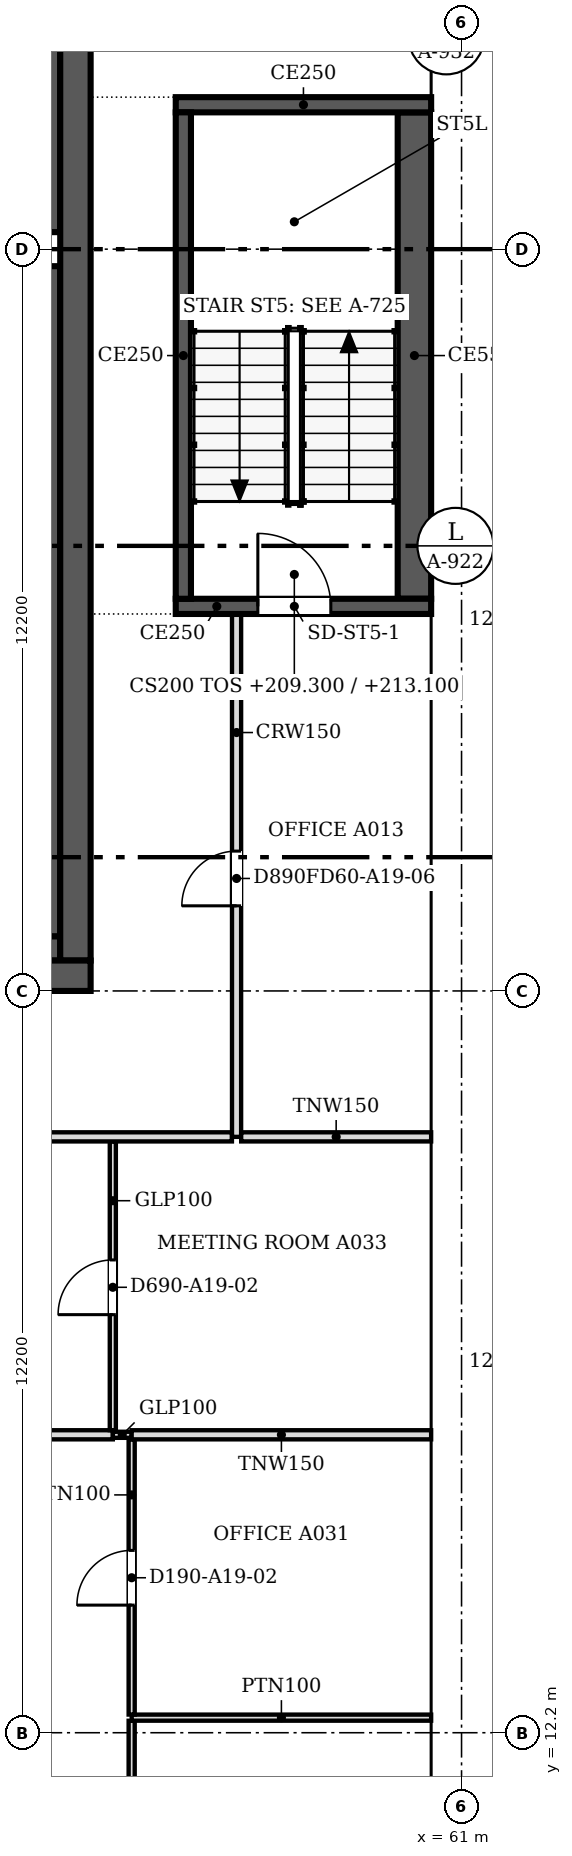
"""IFC4 building model, lengths in metres.
Left out: names, types, materials, properties, quantities, classifications, styles, units other than length and angle.
Written with IfcOpenShell. Run it as: python <this file> out.ifc"""

import sys

from ifc_helpers import new_model, si_unit, direction, frame, frame_2d, origin, place, context, subcontext, project, spatial, polyline, rectangle, outline, extrude, faceted_brep, source, transform, mapped, element, fill, save


model = new_model("IFC4")
c1 = context("Model", 3, precision=1e-05, world=origin(), true_north=direction((0.0, 1.0)))
c2 = subcontext(c1, "Body", "Model", "MODEL_VIEW")
j1 = project(units=[si_unit("LENGTHUNIT", "METRE"), si_unit("PLANEANGLEUNIT", "RADIAN")], contexts=[c1])
p1 = place(None, origin())
s1 = spatial("IfcSite", under=j1, at=p1, CompositionType="ELEMENT")
p2 = place(p1, origin())
s2 = spatial("IfcBuilding", under=s1, at=p2, CompositionType="ELEMENT")
p3 = place(p2, frame((0.0, 0.0, 209.3)))
s3 = spatial("IfcBuildingStorey", under=s2, at=p3, CompositionType="ELEMENT", Elevation=209.3)
m1 = source(origin(), c2, "Body", "SweptSolid", [
    extrude(outline(polyline([(3.05, 0.0), (6.1, 3.8), (3.05, 7.6), (0.0, 3.8), (3.05, 0.0)])), frame((0.0, 0.25, 0.0), z_axis=(0.0, -1.0, 0.0), x_axis=(1.0, 0.0, 0.0)), (0.0, 0.0, 1.0), 0.5),
])
p4 = place(p3, frame((60.75, 9.15, -3.8), z_axis=(0.0, 0.0, 1.0), x_axis=(0.0, 1.0, 0.0)))
e1 = element("IfcWall", 1, at=p4, inside=s3, PredefinedType="SOLIDWALL", context=c2, shape_type="MappedRepresentation", body=[
    mapped(m1, transform((0.0, 0.0, 0.0), scale=1.0)),
])
m2 = source(origin(), c2, "Body", "SweptSolid", [
    extrude(outline(polyline([(3.05, 0.399), (5.78, 3.8), (3.05, 7.201), (0.321, 3.8), (3.05, 0.399)])), frame((0.0, 0.26, 0.0), z_axis=(0.0, -1.0, 0.0), x_axis=(1.0, 0.0, 0.0)), (0.0, 0.0, 1.0), 0.52),
])
p5 = place(p4, origin())
e2 = element("IfcOpeningElement", 2, at=p5, cuts=e1, PredefinedType="OPENING", context=c2, shape_type="MappedRepresentation", body=[
    mapped(m2, transform((0.0, 0.0, 0.0), scale=1.0)),
])
p6 = place(p3, frame((60.75, 15.25, -3.8), z_axis=(0.0, 0.0, 1.0), x_axis=(0.0, 1.0, 0.0)))
e3 = element("IfcWall", 3, at=p6, inside=s3, PredefinedType="SOLIDWALL", context=c2, shape_type="MappedRepresentation", body=[
    mapped(m1, transform((0.0, 0.0, 0.0), scale=1.0)),
])
p7 = place(p6, origin())
e4 = element("IfcOpeningElement", 4, at=p7, cuts=e3, PredefinedType="OPENING", context=c2, shape_type="MappedRepresentation", body=[
    mapped(m2, transform((0.0, 0.0, 0.0), scale=1.0)),
])
m3 = source(origin(), c2, "Body", "Brep", [
    faceted_brep([(3.05, -0.25, 0.0), (6.1, -0.25, 3.8), (6.1, -0.25, 3.8), (3.05, -0.25, 7.6), (0.0, -0.25, 3.8), (0.0, 0.25, 3.8), (3.05, 0.25, 7.6), (6.1, 0.25, 3.8), (6.1, 0.25, 3.8), (3.05, 0.25, 0.0)], [[[0, 1, 2, 3, 4]], [[5, 6, 7, 8, 9]], [[9, 8, 1, 0]], [[7, 6, 3, 2]], [[6, 5, 4, 3]], [[5, 9, 0, 4]], [[1, 8, 7, 2]]]),
])
p8 = place(p3, frame((60.75, 21.35, -3.8), z_axis=(0.0, 0.0, 1.0), x_axis=(0.0, 1.0, 0.0)))
e5 = element("IfcWall", 5, at=p8, inside=s3, PredefinedType="SOLIDWALL", context=c2, shape_type="MappedRepresentation", body=[
    mapped(m3, transform((0.0, 0.0, 0.0), scale=1.0)),
])
p9 = place(p8, origin())
e6 = element("IfcOpeningElement", 6, at=p9, cuts=e5, PredefinedType="OPENING", context=c2, shape_type="MappedRepresentation", body=[
    mapped(m2, transform((0.0, 0.0, 0.0), scale=1.0)),
])
p10 = place(p3, frame((60.75, 27.45, -3.8), z_axis=(0.0, 0.0, 1.0), x_axis=(0.0, 1.0, 0.0)))
e7 = element("IfcWall", 7, at=p10, inside=s3, PredefinedType="SOLIDWALL", context=c2, shape_type="MappedRepresentation", body=[
    mapped(m1, transform((0.0, 0.0, 0.0), scale=1.0)),
])
p11 = place(p10, origin())
e8 = element("IfcOpeningElement", 8, at=p11, cuts=e7, PredefinedType="OPENING", context=c2, shape_type="MappedRepresentation", body=[
    mapped(m2, transform((0.0, 0.0, 0.0), scale=1.0)),
])
p12 = place(p3, frame((60.75, 33.55, -3.8), z_axis=(0.0, 0.0, 1.0), x_axis=(0.0, 1.0, 0.0)))
e9 = element("IfcWall", 9, at=p12, inside=s3, PredefinedType="SOLIDWALL", context=c2, shape_type="MappedRepresentation", body=[
    mapped(m3, transform((0.0, 0.0, 0.0), scale=1.0)),
])
p13 = place(p12, origin())
e10 = element("IfcOpeningElement", 10, at=p13, cuts=e9, PredefinedType="OPENING", context=c2, shape_type="MappedRepresentation", body=[
    mapped(m2, transform((0.0, 0.0, 0.0), scale=1.0)),
])
p14 = place(p3, frame((60.75, 39.65, -3.8), z_axis=(0.0, 0.0, 1.0), x_axis=(0.0, 1.0, 0.0)))
e11 = element("IfcWall", 11, at=p14, inside=s3, PredefinedType="SOLIDWALL", context=c2, shape_type="MappedRepresentation", body=[
    mapped(m1, transform((0.0, 0.0, 0.0), scale=1.0)),
])
p15 = place(p14, origin())
e12 = element("IfcOpeningElement", 12, at=p15, cuts=e11, PredefinedType="OPENING", context=c2, shape_type="MappedRepresentation", body=[
    mapped(m2, transform((0.0, 0.0, 0.0), scale=1.0)),
])
p16 = place(p2, frame((0.0, 0.0, 213.1)))
s4 = spatial("IfcBuildingStorey", under=s2, at=p16, CompositionType="ELEMENT", Elevation=213.1)
m4 = source(origin(), c2, "Body", "Brep", [
    faceted_brep([(3.003, -0.25, 0.0), (6.053, -0.25, 3.8), (3.003, -0.25, 7.6), (0.0, -0.25, 3.8), (0.047, 0.25, 3.859), (3.003, 0.25, 7.6), (6.053, 0.25, 3.8), (3.003, 0.25, 0.0), (0.047, 0.25, 3.741), (0.0, 0.0, 3.8)], [[[0, 1, 2, 3]], [[4, 5, 6, 7, 8]], [[7, 6, 1, 0]], [[6, 5, 2, 1]], [[5, 4, 9, 3, 2]], [[8, 7, 0, 3, 9]], [[8, 9, 4]]]),
])
p17 = place(p16, frame((60.75, 6.146, -3.8), z_axis=(0.0, 0.0, 1.0), x_axis=(0.0, 1.0, 0.0)))
e13 = element("IfcWall", 13, at=p17, inside=s4, PredefinedType="SOLIDWALL", context=c2, shape_type="MappedRepresentation", body=[
    mapped(m4, transform((0.0, 0.0, 0.0), scale=1.0)),
])
m5 = source(origin(), c2, "Body", "SweptSolid", [
    extrude(outline(polyline([(3.005, 0.401), (5.733, 3.8), (3.005, 7.199), (0.319, 3.8), (3.005, 0.401)])), frame((0.0, 0.26, 0.0), z_axis=(0.0, -1.0, 0.0), x_axis=(1.0, 0.0, 0.0)), (0.0, 0.0, 1.0), 0.52),
])
p18 = place(p17, origin())
e14 = element("IfcOpeningElement", 14, at=p18, cuts=e13, PredefinedType="OPENING", context=c2, shape_type="MappedRepresentation", body=[
    mapped(m5, transform((0.0, 0.0, 0.0), scale=1.0)),
])
m6 = source(origin(), c2, "Body", "SweptSolid", [
    extrude(outline(polyline([(3.05, 0.0), (6.1, 3.8), (3.05, 7.6), (0.0, 3.8), (3.05, 0.0)])), frame((0.0, 0.25, 0.0), z_axis=(0.0, -1.0, 0.0), x_axis=(1.0, 0.0, 0.0)), (0.0, 0.0, 1.0), 0.5),
])
p19 = place(p16, frame((60.75, 12.2, -3.8), z_axis=(0.0, 0.0, 1.0), x_axis=(0.0, 1.0, 0.0)))
e15 = element("IfcWall", 15, at=p19, inside=s4, PredefinedType="SOLIDWALL", context=c2, shape_type="MappedRepresentation", body=[
    mapped(m6, transform((0.0, 0.0, 0.0), scale=1.0)),
])
m7 = source(origin(), c2, "Body", "SweptSolid", [
    extrude(outline(polyline([(3.05, 0.399), (5.78, 3.8), (3.05, 7.2), (0.321, 3.8), (3.05, 0.399)])), frame((0.0, 0.26, 0.0), z_axis=(0.0, -1.0, 0.0), x_axis=(1.0, 0.0, 0.0)), (0.0, 0.0, 1.0), 0.52),
])
p20 = place(p19, origin())
e16 = element("IfcOpeningElement", 16, at=p20, cuts=e15, PredefinedType="OPENING", context=c2, shape_type="MappedRepresentation", body=[
    mapped(m7, transform((0.0, 0.0, 0.0), scale=1.0)),
])
m8 = source(origin(), c2, "Body", "Brep", [
    faceted_brep([(3.05, -0.25, 0.0), (6.1, -0.25, 3.8), (6.1, -0.25, 3.8), (3.05, -0.25, 7.6), (0.0, -0.25, 3.8), (0.0, 0.25, 3.8), (3.05, 0.25, 7.6), (6.1, 0.25, 3.8), (6.1, 0.25, 3.8), (3.05, 0.25, 0.0)], [[[0, 1, 2, 3, 4]], [[5, 6, 7, 8, 9]], [[9, 8, 1, 0]], [[7, 6, 3, 2]], [[6, 5, 4, 3]], [[5, 9, 0, 4]], [[1, 8, 7, 2]]]),
])
p21 = place(p16, frame((60.75, 18.3, -3.8), z_axis=(0.0, 0.0, 1.0), x_axis=(0.0, 1.0, 0.0)))
e17 = element("IfcWall", 17, at=p21, inside=s4, PredefinedType="SOLIDWALL", context=c2, shape_type="MappedRepresentation", body=[
    mapped(m8, transform((0.0, 0.0, 0.0), scale=1.0)),
])
p22 = place(p21, origin())
e18 = element("IfcOpeningElement", 18, at=p22, cuts=e17, PredefinedType="OPENING", context=c2, shape_type="MappedRepresentation", body=[
    mapped(m7, transform((0.0, 0.0, 0.0), scale=1.0)),
])
p23 = place(p16, frame((60.75, 24.4, -3.8), z_axis=(0.0, 0.0, 1.0), x_axis=(0.0, 1.0, 0.0)))
e19 = element("IfcWall", 19, at=p23, inside=s4, PredefinedType="SOLIDWALL", context=c2, shape_type="MappedRepresentation", body=[
    mapped(m6, transform((0.0, 0.0, 0.0), scale=1.0)),
])
p24 = place(p23, origin())
e20 = element("IfcOpeningElement", 20, at=p24, cuts=e19, PredefinedType="OPENING", context=c2, shape_type="MappedRepresentation", body=[
    mapped(m7, transform((0.0, 0.0, 0.0), scale=1.0)),
])
p25 = place(p16, frame((60.75, 30.5, -3.8), z_axis=(0.0, 0.0, 1.0), x_axis=(0.0, 1.0, 0.0)))
e21 = element("IfcWall", 21, at=p25, inside=s4, PredefinedType="SOLIDWALL", context=c2, shape_type="MappedRepresentation", body=[
    mapped(m6, transform((0.0, 0.0, 0.0), scale=1.0)),
])
p26 = place(p25, origin())
e22 = element("IfcOpeningElement", 22, at=p26, cuts=e21, PredefinedType="OPENING", context=c2, shape_type="MappedRepresentation", body=[
    mapped(m7, transform((0.0, 0.0, 0.0), scale=1.0)),
])
p27 = place(p16, frame((60.75, 36.6, -3.8), z_axis=(0.0, 0.0, 1.0), x_axis=(0.0, 1.0, 0.0)))
e23 = element("IfcWall", 23, at=p27, inside=s4, PredefinedType="SOLIDWALL", context=c2, shape_type="MappedRepresentation", body=[
    mapped(m8, transform((0.0, 0.0, 0.0), scale=1.0)),
])
p28 = place(p27, origin())
e24 = element("IfcOpeningElement", 24, at=p28, cuts=e23, PredefinedType="OPENING", context=c2, shape_type="MappedRepresentation", body=[
    mapped(m7, transform((0.0, 0.0, 0.0), scale=1.0)),
])
p29 = place(p3, frame((54.9, 24.65, 0.0), z_axis=(0.0, 0.0, 1.0), x_axis=(-1.0, 0.0, 0.0)))
e25 = element("IfcWall", 25, at=p29, inside=s3, PredefinedType="SHEAR", context=c2, shape_type="SweptSolid", body=[
    extrude(rectangle(XDim=24.4, YDim=0.5, at=frame_2d((12.2, 0.0))), origin(), (0.0, 0.0, 1.0), 3.8),
])
m9 = source(origin(), c2, "Body", "SweptSolid", [
    extrude(rectangle(XDim=1.2, YDim=2.1, at=frame_2d((0.6, 1.05))), frame((0.0, 0.26, 0.0), z_axis=(0.0, -1.0, 0.0), x_axis=(1.0, 0.0, 0.0)), (0.0, 0.0, 1.0), 0.52),
])
p30 = place(p29, frame((1.5, 0.0, 0.0)))
e26 = element("IfcOpeningElement", 26, at=p30, cuts=e25, PredefinedType="OPENING", context=c2, shape_type="MappedRepresentation", body=[
    mapped(m9, transform((0.0, 0.0, 0.0), scale=1.0)),
])
p31 = place(p3, frame((54.65, 48.3, 0.0), z_axis=(0.0, 0.0, 1.0), x_axis=(0.0, -1.0, 0.0)))
e27 = element("IfcWall", 27, at=p31, inside=s3, PredefinedType="SHEAR", context=c2, shape_type="SweptSolid", body=[
    extrude(rectangle(XDim=23.4, YDim=0.5, at=frame_2d((11.7, 0.0))), origin(), (0.0, 0.0, 1.0), 3.8),
])
p32 = place(p31, frame((5.0, 0.0, 0.0)))
e28 = element("IfcOpeningElement", 28, at=p32, cuts=e27, PredefinedType="OPENING", context=c2, shape_type="MappedRepresentation", body=[
    mapped(m9, transform((0.0, 0.0, 0.0), scale=1.0)),
])
p33 = place(p3, frame((53.4, 25.1, 0.0), z_axis=(0.0, 0.0, 1.0), x_axis=(1.0, 0.0, 0.0)))
e29 = element("IfcWall", 29, at=p33, inside=s3, PredefinedType="SOLIDWALL", context=c2, shape_type="SweptSolid", body=[
    extrude(rectangle(XDim=1.0, YDim=0.4, at=frame_2d((0.5, 0.0))), origin(), (0.0, 0.0, 1.0), 3.8),
])
p34 = place(p3, frame((54.2, 25.3, 0.0), z_axis=(0.0, 0.0, 1.0), x_axis=(0.0, 1.0, 0.0)))
e30 = element("IfcWall", 30, at=p34, inside=s3, PredefinedType="SOLIDWALL", context=c2, shape_type="SweptSolid", body=[
    extrude(rectangle(XDim=11.02, YDim=0.4, at=frame_2d((5.51, 0.0))), origin(), (0.0, 0.0, 1.0), 3.8),
])
p35 = place(p3, frame((54.2, 36.88, 0.0), z_axis=(0.0, 0.0, 1.0), x_axis=(0.0, 1.0, 0.0)))
e31 = element("IfcWall", 31, at=p35, inside=s3, PredefinedType="SOLIDWALL", context=c2, shape_type="SweptSolid", body=[
    extrude(rectangle(XDim=5.22, YDim=0.4, at=frame_2d((2.61, 0.0))), origin(), (0.0, 0.0, 1.0), 3.8),
])
p36 = place(p3, frame((60.5, 30.725, 0.0), z_axis=(0.0, 0.0, 1.0), x_axis=(-1.0, 0.0, 0.0)))
e32 = element("IfcWall", 32, at=p36, inside=s3, PredefinedType="SOLIDWALL", context=c2, shape_type="SweptSolid", body=[
    extrude(rectangle(XDim=4.2, YDim=0.25, at=frame_2d((2.1, 0.0))), origin(), (0.0, 0.0, 1.0), 3.8),
])
m10 = source(origin(), c2, "Body", "SweptSolid", [
    extrude(rectangle(XDim=1.2, YDim=2.1, at=frame_2d((0.6, 1.05))), frame((0.0, 0.135, 0.0), z_axis=(0.0, -1.0, 0.0), x_axis=(1.0, 0.0, 0.0)), (0.0, 0.0, 1.0), 0.27),
])
p37 = place(p36, frame((1.65, 0.0, 0.0)))
e33 = element("IfcOpeningElement", 33, at=p37, cuts=e32, PredefinedType="OPENING", context=c2, shape_type="MappedRepresentation", body=[
    mapped(m10, transform((0.0, 0.0, 0.0), scale=1.0)),
])
p38 = place(p3, frame((56.425, 30.85, 0.0), z_axis=(0.0, 0.0, 1.0), x_axis=(0.0, 1.0, 0.0)))
e34 = element("IfcWall", 34, at=p38, inside=s3, PredefinedType="SOLIDWALL", context=c2, shape_type="SweptSolid", body=[
    extrude(rectangle(XDim=8.0, YDim=0.25, at=frame_2d((4.0, 0.0))), origin(), (0.0, 0.0, 1.0), 3.8),
])
p39 = place(p3, frame((56.3, 38.975, 0.0), z_axis=(0.0, 0.0, 1.0), x_axis=(1.0, 0.0, 0.0)))
e35 = element("IfcWall", 35, at=p39, inside=s3, PredefinedType="SOLIDWALL", context=c2, shape_type="SweptSolid", body=[
    extrude(rectangle(XDim=4.2, YDim=0.25, at=frame_2d((2.1, 0.0))), origin(), (0.0, 0.0, 1.0), 3.8),
])
p40 = place(p3, frame((60.225, 38.85, 0.0), z_axis=(0.0, 0.0, 1.0), x_axis=(0.0, -1.0, 0.0)))
e36 = element("IfcWall", 36, at=p40, inside=s3, PredefinedType="SOLIDWALL", context=c2, shape_type="SweptSolid", body=[
    extrude(rectangle(XDim=8.0, YDim=0.55, at=frame_2d((4.0, 0.0))), origin(), (0.0, 0.0, 1.0), 3.8),
])
p41 = place(p3, frame((55.575, 12.397, 0.0), z_axis=(0.0, 0.0, 1.0), x_axis=(0.0, -1.0, 0.0)))
e37 = element("IfcWall", 37, at=p41, inside=s3, PredefinedType="PARTITIONING", context=c2, shape_type="SweptSolid", body=[
    extrude(rectangle(XDim=4.297, YDim=0.1, at=frame_2d((2.148, 0.0))), origin(), (0.0, 0.0, 1.0), 3.067),
])
m11 = source(origin(), c2, "Body", "SweptSolid", [
    extrude(rectangle(XDim=0.9, YDim=2.1, at=frame_2d((0.45, 1.05))), frame((0.0, 0.06, 0.0), z_axis=(0.0, -1.0, 0.0), x_axis=(1.0, 0.0, 0.0)), (0.0, 0.0, 1.0), 0.12),
])
p42 = place(p41, frame((1.697, 0.0, 0.0)))
e38 = element("IfcOpeningElement", 38, at=p42, cuts=e37, PredefinedType="OPENING", context=c2, shape_type="MappedRepresentation", body=[
    mapped(m11, transform((0.0, 0.0, 0.0), scale=1.0)),
])
p43 = place(p3, frame((55.575, 12.448, 0.0), z_axis=(0.0, 0.0, 1.0), x_axis=(1.0, 0.0, 0.0)))
e39 = element("IfcWall", 39, at=p43, inside=s3, PredefinedType="PARTITIONING", context=c2, shape_type="SweptSolid", body=[
    extrude(rectangle(XDim=4.925, YDim=0.1, at=frame_2d((2.462, 0.0))), origin(), (0.0, 0.0, 1.0), 3.067),
])
p44 = place(p3, frame((55.575, 17.024, 0.0), z_axis=(0.0, 0.0, 1.0), x_axis=(0.0, -1.0, 0.0)))
e40 = element("IfcWall", 40, at=p44, inside=s3, PredefinedType="PARTITIONING", context=c2, shape_type="SweptSolid", body=[
    extrude(rectangle(XDim=4.525, YDim=0.1, at=frame_2d((2.263, 0.0))), origin(), (0.0, 0.0, 1.0), 3.067),
])
p45 = place(p44, frame((1.825, 0.0, 0.0)))
e41 = element("IfcOpeningElement", 41, at=p45, cuts=e40, PredefinedType="OPENING", context=c2, shape_type="MappedRepresentation", body=[
    mapped(m11, transform((0.0, 0.0, 0.0), scale=1.0)),
])
p46 = place(p3, frame((46.476, 17.1, 0.0), z_axis=(0.0, 0.0, 1.0), x_axis=(1.0, 0.0, 0.0)))
e42 = element("IfcWall", 42, at=p46, inside=s3, PredefinedType="PARTITIONING", context=c2, shape_type="SweptSolid", body=[
    extrude(rectangle(XDim=8.789, YDim=0.15, at=frame_2d((4.395, 0.0))), origin(), (0.0, 0.0, 1.0), 3.067),
])
p47 = place(p3, frame((55.266, 17.1, 0.0), z_axis=(0.0, 0.0, 1.0), x_axis=(1.0, 0.0, 0.0)))
e43 = element("IfcWall", 43, at=p47, inside=s3, PredefinedType="PARTITIONING", context=c2, shape_type="SweptSolid", body=[
    extrude(rectangle(XDim=0.308, YDim=0.1, at=frame_2d((0.154, 0.0))), origin(), (0.0, 0.0, 1.0), 3.067),
])
p48 = place(p3, frame((55.575, 17.1, 0.0), z_axis=(0.0, 0.0, 1.0), x_axis=(1.0, 0.0, 0.0)))
e44 = element("IfcWall", 44, at=p48, inside=s3, PredefinedType="PARTITIONING", context=c2, shape_type="SweptSolid", body=[
    extrude(rectangle(XDim=4.925, YDim=0.15, at=frame_2d((2.462, 0.0))), origin(), (0.0, 0.0, 1.0), 3.067),
])
p49 = place(p3, frame((55.265, 21.924, 0.0), z_axis=(0.0, 0.0, 1.0), x_axis=(0.0, -1.0, 0.0)))
e45 = element("IfcWall", 45, at=p49, inside=s3, PredefinedType="PARTITIONING", context=c2, shape_type="SweptSolid", body=[
    extrude(rectangle(XDim=4.748, YDim=0.1, at=frame_2d((2.374, 0.0))), origin(), (0.0, 0.0, 1.0), 3.067),
])
p50 = place(p49, frame((1.948, 0.0, 0.0)))
e46 = element("IfcOpeningElement", 46, at=p50, cuts=e45, PredefinedType="OPENING", context=c2, shape_type="MappedRepresentation", body=[
    mapped(m11, transform((0.0, 0.0, 0.0), scale=1.0)),
])
p51 = place(p3, frame((46.4, 22.0, 0.0), z_axis=(0.0, 0.0, 1.0), x_axis=(1.0, 0.0, 0.0)))
e47 = element("IfcWall", 47, at=p51, inside=s3, PredefinedType="PARTITIONING", context=c2, shape_type="SweptSolid", body=[
    extrude(rectangle(XDim=10.824, YDim=0.15, at=frame_2d((5.412, 0.0))), origin(), (0.0, 0.0, 1.0), 3.067),
])
p52 = place(p3, frame((57.3, 30.6, 0.0), z_axis=(0.0, 0.0, 1.0), x_axis=(0.0, -1.0, 0.0)))
e48 = element("IfcWall", 48, at=p52, inside=s3, PredefinedType="PARTITIONING", context=c2, shape_type="SweptSolid", body=[
    extrude(rectangle(XDim=8.6, YDim=0.15, at=frame_2d((4.3, 0.0))), origin(), (0.0, 0.0, 1.0), 3.067),
])
m12 = source(origin(), c2, "Body", "SweptSolid", [
    extrude(rectangle(XDim=0.9, YDim=2.1, at=frame_2d((0.45, 1.05))), frame((0.0, 0.085, 0.0), z_axis=(0.0, -1.0, 0.0), x_axis=(1.0, 0.0, 0.0)), (0.0, 0.0, 1.0), 0.17),
])
p53 = place(p52, frame((3.9, 0.0, 0.0)))
e49 = element("IfcOpeningElement", 49, at=p53, cuts=e48, PredefinedType="OPENING", context=c2, shape_type="MappedRepresentation", body=[
    mapped(m12, transform((0.0, 0.0, 0.0), scale=1.0)),
])
p54 = place(p3, frame((57.376, 22.0, 0.0), z_axis=(0.0, 0.0, 1.0), x_axis=(1.0, 0.0, 0.0)))
e50 = element("IfcWall", 50, at=p54, inside=s3, PredefinedType="PARTITIONING", context=c2, shape_type="SweptSolid", body=[
    extrude(rectangle(XDim=3.124, YDim=0.15, at=frame_2d((1.562, 0.0))), origin(), (0.0, 0.0, 1.0), 3.067),
])
m13 = source(origin(), c2, "Body", "SweptSolid", [
    extrude(rectangle(XDim=1.2, YDim=2.1, at=frame_2d((0.6, 1.05))), frame((0.0, 0.025, 0.0), z_axis=(0.0, -1.0, 0.0), x_axis=(1.0, 0.0, 0.0)), (0.0, 0.0, 1.0), 0.05),
])
p55 = place(p37, origin())
e51 = element("IfcDoor", 51, at=p55, inside=s3, OperationType="SINGLE_SWING_RIGHT", PredefinedType="DOOR", context=c2, shape_type="MappedRepresentation", body=[
    mapped(m13, transform((0.0, 0.0, 0.0), scale=1.0)),
])
fill(e33, e51)
m14 = source(origin(), c2, "Body", "SweptSolid", [
    extrude(rectangle(XDim=0.9, YDim=2.1, at=frame_2d((0.45, 1.05))), frame((0.0, 0.025, 0.0), z_axis=(0.0, -1.0, 0.0), x_axis=(1.0, 0.0, 0.0)), (0.0, 0.0, 1.0), 0.05),
])
p56 = place(p45, origin())
e52 = element("IfcDoor", 52, at=p56, inside=s3, OperationType="SINGLE_SWING_RIGHT", PredefinedType="DOOR", context=c2, shape_type="MappedRepresentation", body=[
    mapped(m14, transform((0.0, 0.0, 0.0), scale=1.0)),
])
fill(e41, e52)
p57 = place(p50, origin())
e53 = element("IfcDoor", 53, at=p57, inside=s3, OperationType="SINGLE_SWING_RIGHT", PredefinedType="DOOR", context=c2, shape_type="MappedRepresentation", body=[
    mapped(m14, transform((0.0, 0.0, 0.0), scale=1.0)),
])
fill(e46, e53)
p58 = place(p53, origin())
e54 = element("IfcDoor", 54, at=p58, inside=s3, OperationType="SINGLE_SWING_RIGHT", PredefinedType="DOOR", context=c2, shape_type="MappedRepresentation", body=[
    mapped(m14, transform((0.0, 0.0, 0.0), scale=1.0)),
])
fill(e49, e54)
save(model, sys.argv[1])
